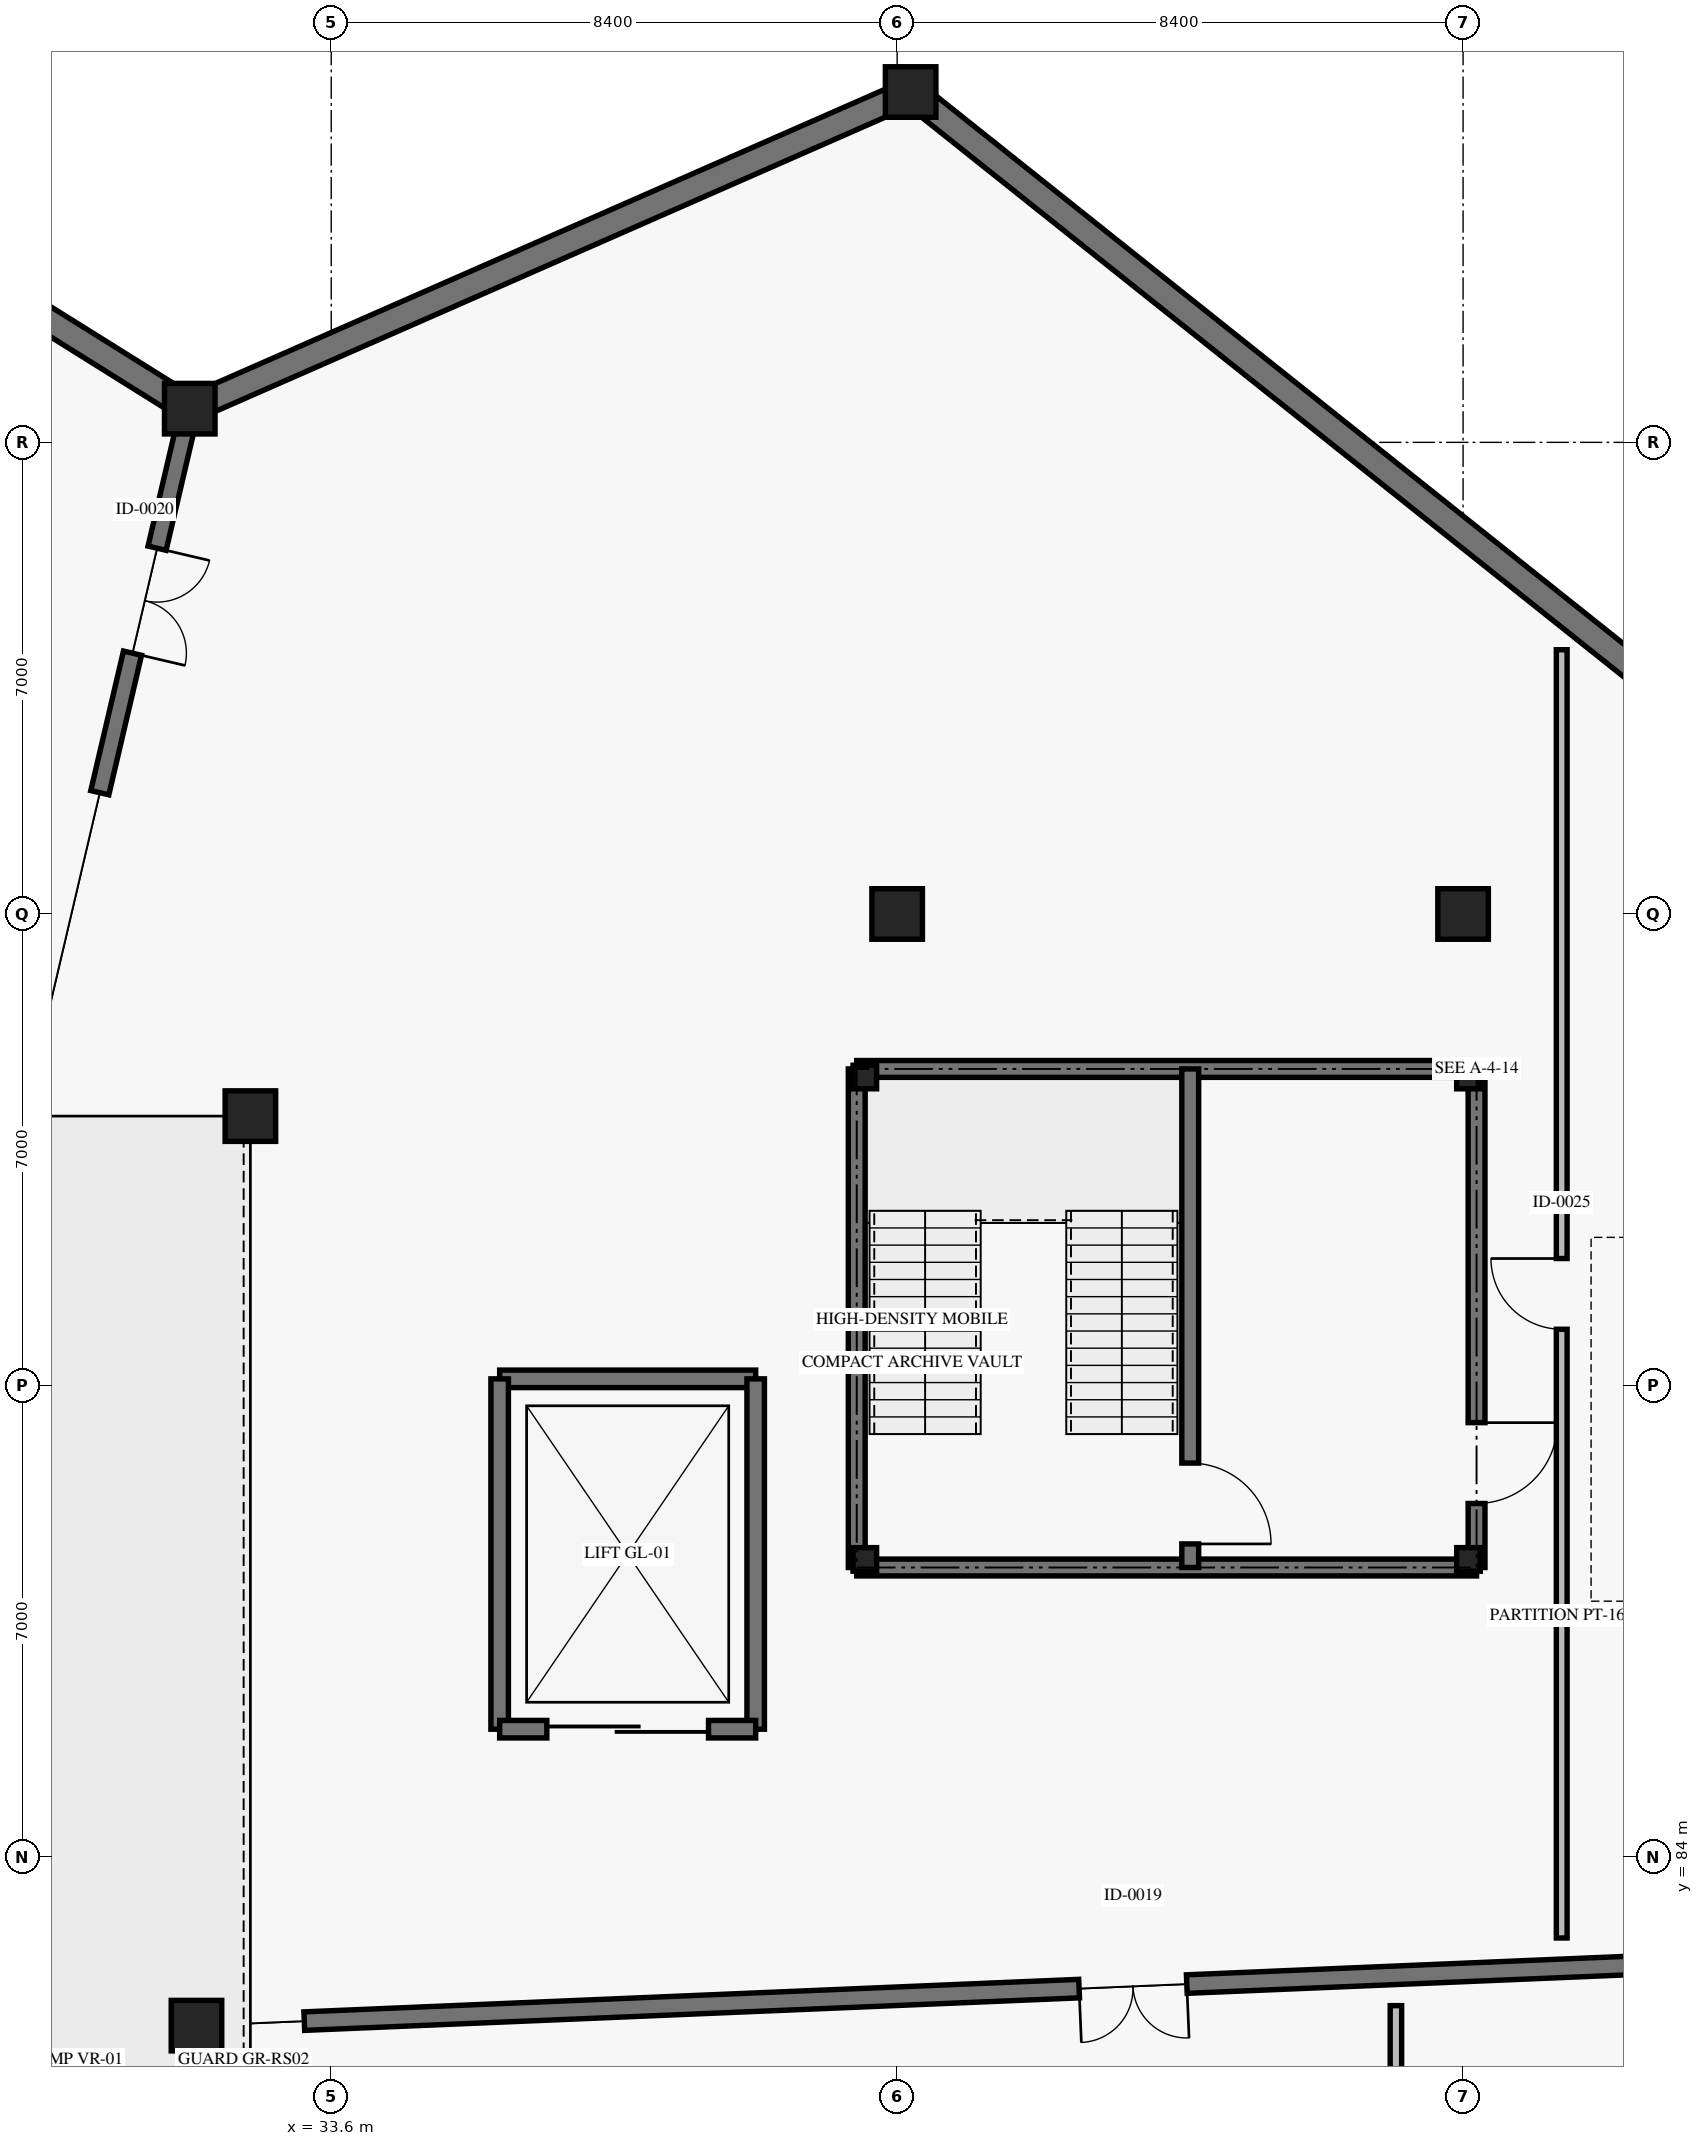
"""IFC4 building model, lengths in metres.
Left out: names, types, materials, properties, quantities, classifications, styles, units other than length and angle.
Written with IfcOpenShell. Run it as: python <this file> out.ifc"""

import sys

from ifc_helpers import new_model, si_unit, direction, frame, frame_2d, origin, origin_2d, place, context, subcontext, project, spatial, rectangle, i_section, extrude, element, fill, save


model = new_model("IFC4")
c1 = context("Model", 3, precision=1e-05, world=origin(), true_north=direction((0.0, 1.0)))
c2 = subcontext(c1, "Body", "Model", "MODEL_VIEW")
j1 = project(units=[si_unit("LENGTHUNIT", "METRE"), si_unit("PLANEANGLEUNIT", "RADIAN")], contexts=[c1])
p1 = place(None, origin())
s1 = spatial("IfcSite", under=j1, at=p1, CompositionType="ELEMENT")
p2 = place(p1, origin())
s2 = spatial("IfcBuilding", under=s1, at=p2, CompositionType="ELEMENT")
p3 = place(p2, frame((0.0, 0.0, -4.5)))
s3 = spatial("IfcBuildingStorey", under=s2, at=p3, CompositionType="ELEMENT", Elevation=-4.5)
for number, where, z_axis, x_axis in (
    (1, (31.5, 105.5, 0.0), (0.0, 0.0, 1.0), (1.0, 0.0, 0.0)),
    (2, (31.6, 81.5, 0.0), (0.0, 0.0, 1.0), (1.0, 0.0, 0.0)),
    (3, (42.2, 110.2, 0.0), (0.0, 0.0, 1.0), (1.0, 0.0, 0.0)),
    (4, (42.0, 98.0, 0.0), (0.0, 0.0, 1.0), (1.0, 0.0, 0.0)),
    (5, (50.4, 98.0, 0.0), (0.0, 0.0, 1.0), (1.0, 0.0, 0.0)),
    (6, (32.4, 95.0, 0.0), (0.0, 0.0, 1.0), (1.0, 0.0, 0.0)),
):
    element("IfcColumn", number, at=place(p3, frame(where, z_axis=z_axis, x_axis=x_axis)), inside=s3, PredefinedType="COLUMN", context=c2, shape_type="SweptSolid", body=[
        extrude(rectangle(XDim=0.75, YDim=0.75, at=origin_2d()), origin(), (0.0, 0.0, 1.0), 4.5),
    ])
for number, where, z_axis, x_axis in (
    (7, (41.52, 88.42, 0.0), (0.0, 0.0, 1.0), (1.0, 0.0, 0.0)),
    (8, (50.48, 88.42, 0.0), (0.0, 0.0, 1.0), (1.0, 0.0, 0.0)),
    (9, (50.48, 95.58, 0.0), (0.0, 0.0, 1.0), (1.0, 0.0, 0.0)),
    (10, (41.52, 95.58, 0.0), (0.0, 0.0, 1.0), (1.0, 0.0, 0.0)),
):
    element("IfcColumn", number, at=place(p3, frame(where, z_axis=z_axis, x_axis=x_axis)), inside=s3, PredefinedType="COLUMN", context=c2, shape_type="SweptSolid", body=[
        extrude(i_section(OverallWidth=0.35, OverallDepth=0.35, WebThickness=0.02, FlangeThickness=0.028, at=origin_2d()), origin(), (0.0, 0.0, 1.0), 4.5),
    ])
p4 = place(p3, frame((62.4, 94.1, 0.0), z_axis=(0.0, 0.0, 1.0), x_axis=(-0.78200261515, 0.623275147827, 0.0)))
e11 = element("IfcWall", 11, at=p4, inside=s3, PredefinedType="USERDEFINED", context=c2, shape_type="SweptSolid", body=[
    extrude(rectangle(XDim=25.831, YDim=0.38, at=frame_2d((12.916, 0.0))), origin(), (0.0, 0.0, 1.0), 4.14),
])
p5 = place(p3, frame((42.2, 110.2, 0.0), z_axis=(0.0, 0.0, 1.0), x_axis=(-0.915563585263, -0.402173247918, 0.0)))
e12 = element("IfcWall", 12, at=p5, inside=s3, PredefinedType="USERDEFINED", context=c2, shape_type="SweptSolid", body=[
    extrude(rectangle(XDim=11.637, YDim=0.38, at=frame_2d((5.818, 0.0))), origin(), (0.0, 0.0, 1.0), 4.14),
])
p6 = place(p3, frame((31.458, 105.526, 0.0), z_axis=(0.0, 0.0, 1.0), x_axis=(-0.847982583258, 0.530024092369, 0.0)))
e13 = element("IfcWall", 13, at=p6, inside=s3, PredefinedType="USERDEFINED", context=c2, shape_type="SweptSolid", body=[
    extrude(rectangle(XDim=12.215, YDim=0.38, at=frame_2d((6.107, 0.0))), origin(), (0.0, 0.0, 1.0), 4.14),
])
p7 = place(p3, frame((57.8, 82.6, 0.0), z_axis=(0.0, 0.0, 1.0), x_axis=(-0.999119166836, -0.041962965345, 0.0)))
e14 = element("IfcWall", 14, at=p7, inside=s3, PredefinedType="SOLIDWALL", context=c2, shape_type="SweptSolid", body=[
    extrude(rectangle(XDim=24.622, YDim=0.275, at=frame_2d((12.311, 0.0))), origin(), (0.0, 0.0, 1.0), 4.14),
])
p8 = place(p7, frame((11.511, 0.0, 0.0)))
e15 = element("IfcOpeningElement", 15, at=p8, cuts=e14, PredefinedType="OPENING", context=c2, shape_type="SweptSolid", body=[
    extrude(rectangle(XDim=1.6, YDim=2.45, at=frame_2d((0.8, 1.225))), frame((0.0, 0.147, 0.0), z_axis=(0.0, -1.0, 0.0), x_axis=(1.0, 0.0, 0.0)), (0.0, 0.0, 1.0), 0.295),
])
p9 = place(p3, frame((31.5, 105.5, 0.0), z_axis=(0.0, 0.0, 1.0), x_axis=(-0.228035044918, -0.973652924963, 0.0)))
e16 = element("IfcWall", 16, at=p9, inside=s3, PredefinedType="SOLIDWALL", context=c2, shape_type="SweptSolid", body=[
    extrude(rectangle(XDim=5.854, YDim=0.275, at=frame_2d((2.927, 0.0))), origin(), (0.0, 0.0, 1.0), 4.14),
])
p10 = place(p9, frame((2.127, 0.0, 0.0)))
e17 = element("IfcOpeningElement", 17, at=p10, cuts=e16, PredefinedType="OPENING", context=c2, shape_type="SweptSolid", body=[
    extrude(rectangle(XDim=1.6, YDim=2.45, at=frame_2d((0.8, 1.225))), frame((0.0, 0.147, 0.0), z_axis=(0.0, -1.0, 0.0), x_axis=(1.0, 0.0, 0.0)), (0.0, 0.0, 1.0), 0.295),
])
p11 = place(p3, frame((49.403, 57.267, 0.0), z_axis=(0.0, 0.0, 1.0), x_axis=(0.0, 1.0, 0.0)))
e18 = element("IfcWall", 18, at=p11, inside=s3, PredefinedType="PARTITIONING", context=c2, shape_type="SweptSolid", body=[
    extrude(rectangle(XDim=24.53, YDim=0.17, at=frame_2d((12.265, 0.0))), origin(), (0.0, 0.0, 1.0), 3.02),
])
p12 = place(p11, frame((11.715, 0.0, 0.0)))
e19 = element("IfcOpeningElement", 19, at=p12, cuts=e18, PredefinedType="OPENING", context=c2, shape_type="SweptSolid", body=[
    extrude(rectangle(XDim=1.1, YDim=2.2, at=frame_2d((0.55, 1.1))), frame((0.0, 0.095, 0.0), z_axis=(0.0, -1.0, 0.0), x_axis=(1.0, 0.0, 0.0)), (0.0, 0.0, 1.0), 0.19),
])
p13 = place(p3, frame((51.864, 82.801, 0.0), z_axis=(0.0, 0.0, 1.0), x_axis=(0.0, 1.0, 0.0)))
e20 = element("IfcWall", 20, at=p13, inside=s3, PredefinedType="PARTITIONING", context=c2, shape_type="SweptSolid", body=[
    extrude(rectangle(XDim=19.121, YDim=0.16, at=frame_2d((9.561, 0.0))), origin(), (0.0, 0.0, 1.0), 3.02),
])
p14 = place(p13, frame((9.035, 0.0, 0.0)))
e21 = element("IfcOpeningElement", 21, at=p14, cuts=e20, PredefinedType="OPENING", context=c2, shape_type="SweptSolid", body=[
    extrude(rectangle(XDim=1.05, YDim=2.2, at=frame_2d((0.525, 1.1))), frame((0.0, 0.09, 0.0), z_axis=(0.0, -1.0, 0.0), x_axis=(1.0, 0.0, 0.0)), (0.0, 0.0, 1.0), 0.18),
])
p15 = place(p3, frame((41.4, 88.3, 0.0), z_axis=(0.0, 0.0, 1.0), x_axis=(0.0, 1.0, 0.0)))
e22 = element("IfcWall", 22, at=p15, inside=s3, PredefinedType="SHEAR", context=c2, shape_type="SweptSolid", body=[
    extrude(rectangle(XDim=7.4, YDim=0.25, at=frame_2d((3.7, 0.0))), origin(), (0.0, 0.0, 1.0), 4.14),
])
for number, where, z_axis, x_axis in (
    (23, (41.4, 95.7, 0.0), (0.0, 0.0, 1.0), (1.0, 0.0, 0.0)),
    (24, (50.6, 88.3, 0.0), (0.0, 0.0, 1.0), (-1.0, 0.0, 0.0)),
):
    element("IfcWall", number, at=place(p3, frame(where, z_axis=z_axis, x_axis=x_axis)), inside=s3, PredefinedType="SHEAR", context=c2, shape_type="SweptSolid", body=[
        extrude(rectangle(XDim=9.2, YDim=0.25, at=frame_2d((4.6, 0.0))), origin(), (0.0, 0.0, 1.0), 4.14),
    ])
p16 = place(p3, frame((50.6, 95.7, 0.0), z_axis=(0.0, 0.0, 1.0), x_axis=(0.0, -1.0, 0.0)))
e25 = element("IfcWall", 25, at=p16, inside=s3, PredefinedType="SHEAR", context=c2, shape_type="SweptSolid", body=[
    extrude(rectangle(XDim=7.4, YDim=0.25, at=frame_2d((3.7, 0.0))), origin(), (0.0, 0.0, 1.0), 4.14),
])
p17 = place(p16, frame((5.25, 0.0, 0.0)))
e26 = element("IfcOpeningElement", 26, at=p17, cuts=e25, PredefinedType="OPENING", context=c2, shape_type="SweptSolid", body=[
    extrude(rectangle(XDim=1.2, YDim=2.2, at=frame_2d((0.6, 1.1))), frame((0.0, 0.135, 0.0), z_axis=(0.0, -1.0, 0.0), x_axis=(1.0, 0.0, 0.0)), (0.0, 0.0, 1.0), 0.27),
])
p18 = place(p3, frame((46.35, 95.7, 0.0), z_axis=(0.0, 0.0, 1.0), x_axis=(0.0, -1.0, 0.0)))
e27 = element("IfcWall", 27, at=p18, inside=s3, PredefinedType="SHEAR", context=c2, shape_type="SweptSolid", body=[
    extrude(rectangle(XDim=7.4, YDim=0.25, at=frame_2d((3.7, 0.0))), origin(), (0.0, 0.0, 1.0), 4.14),
])
p19 = place(p18, frame((5.85, 0.0, 0.0)))
e28 = element("IfcOpeningElement", 28, at=p19, cuts=e27, PredefinedType="OPENING", context=c2, shape_type="SweptSolid", body=[
    extrude(rectangle(XDim=1.2, YDim=2.2, at=frame_2d((0.6, 1.1))), frame((0.0, 0.135, 0.0), z_axis=(0.0, -1.0, 0.0), x_axis=(1.0, 0.0, 0.0)), (0.0, 0.0, 1.0), 0.27),
])
p20 = place(p3, frame((36.1, 91.1, 0.0), z_axis=(0.0, 0.0, 1.0), x_axis=(1.0, 0.0, 0.0)))
e29 = element("IfcWall", 29, at=p20, inside=s3, PredefinedType="SHEAR", context=c2, shape_type="SweptSolid", body=[
    extrude(rectangle(XDim=3.8, YDim=0.26, at=frame_2d((1.9, 0.0))), origin(), (0.0, 0.0, 1.0), 4.26),
])
for number, where, z_axis, x_axis in (
    (30, (39.9, 91.1, 0.0), (0.0, 0.0, 1.0), (0.0, -1.0, 0.0)),
    (31, (36.1, 85.9, 0.0), (0.0, 0.0, 1.0), (0.0, 1.0, 0.0)),
):
    element("IfcWall", number, at=place(p3, frame(where, z_axis=z_axis, x_axis=x_axis)), inside=s3, PredefinedType="SHEAR", context=c2, shape_type="SweptSolid", body=[
        extrude(rectangle(XDim=5.2, YDim=0.26, at=frame_2d((2.6, 0.0))), origin(), (0.0, 0.0, 1.0), 4.26),
    ])
p21 = place(p3, frame((39.9, 85.9, 0.0), z_axis=(0.0, 0.0, 1.0), x_axis=(-1.0, 0.0, 0.0)))
e32 = element("IfcWall", 32, at=p21, inside=s3, PredefinedType="SHEAR", context=c2, shape_type="SweptSolid", body=[
    extrude(rectangle(XDim=3.8, YDim=0.26, at=frame_2d((1.9, 0.0))), origin(), (0.0, 0.0, 1.0), 4.26),
])
p22 = place(p21, frame((0.7, 0.0, 0.0)))
e33 = element("IfcOpeningElement", 33, at=p22, cuts=e32, PredefinedType="OPENING", context=c2, shape_type="SweptSolid", body=[
    extrude(rectangle(XDim=2.4, YDim=2.85, at=frame_2d((1.2, 1.425))), frame((0.0, 0.14, 0.0), z_axis=(0.0, -1.0, 0.0), x_axis=(1.0, 0.0, 0.0)), (0.0, 0.0, 1.0), 0.28),
])
p23 = place(p8, origin())
e34 = element("IfcDoor", 34, at=p23, inside=s3, OperationType="DOUBLE_DOOR_SINGLE_SWING", PredefinedType="DOOR", context=c2, shape_type="SweptSolid", body=[
    extrude(rectangle(XDim=1.6, YDim=2.45, at=frame_2d((0.8, 1.225))), frame((0.0, 0.025, 0.0), z_axis=(0.0, -1.0, 0.0), x_axis=(1.0, 0.0, 0.0)), (0.0, 0.0, 1.0), 0.05),
])
fill(e15, e34)
p24 = place(p10, origin())
e35 = element("IfcDoor", 35, at=p24, inside=s3, OperationType="DOUBLE_DOOR_SINGLE_SWING", PredefinedType="DOOR", context=c2, shape_type="SweptSolid", body=[
    extrude(rectangle(XDim=1.6, YDim=2.45, at=frame_2d((0.8, 1.225))), frame((0.0, 0.025, 0.0), z_axis=(0.0, -1.0, 0.0), x_axis=(1.0, 0.0, 0.0)), (0.0, 0.0, 1.0), 0.05),
])
fill(e17, e35)
p25 = place(p14, origin())
e36 = element("IfcDoor", 36, at=p25, inside=s3, OperationType="SINGLE_SWING_RIGHT", PredefinedType="DOOR", context=c2, shape_type="SweptSolid", body=[
    extrude(rectangle(XDim=1.05, YDim=2.2, at=frame_2d((0.525, 1.1))), frame((0.0, 0.025, 0.0), z_axis=(0.0, -1.0, 0.0), x_axis=(1.0, 0.0, 0.0)), (0.0, 0.0, 1.0), 0.05),
])
fill(e21, e36)
p26 = place(p17, origin())
e37 = element("IfcDoor", 37, at=p26, inside=s3, OperationType="SINGLE_SWING_LEFT", PredefinedType="DOOR", context=c2, shape_type="SweptSolid", body=[
    extrude(rectangle(XDim=1.2, YDim=2.2, at=frame_2d((0.6, 1.1))), frame((0.0, 0.025, 0.0), z_axis=(0.0, -1.0, 0.0), x_axis=(1.0, 0.0, 0.0)), (0.0, 0.0, 1.0), 0.05),
])
fill(e26, e37)
p27 = place(p19, origin())
e38 = element("IfcDoor", 38, at=p27, inside=s3, OperationType="SINGLE_SWING_RIGHT", PredefinedType="DOOR", context=c2, shape_type="SweptSolid", body=[
    extrude(rectangle(XDim=1.2, YDim=2.2, at=frame_2d((0.6, 1.1))), frame((0.0, 0.025, 0.0), z_axis=(0.0, -1.0, 0.0), x_axis=(1.0, 0.0, 0.0)), (0.0, 0.0, 1.0), 0.05),
])
fill(e28, e38)
p28 = place(p22, origin())
e39 = element("IfcDoor", 39, at=p28, inside=s3, OperationType="SLIDING_TO_LEFT", PredefinedType="DOOR", context=c2, shape_type="SweptSolid", body=[
    extrude(rectangle(XDim=2.4, YDim=2.85, at=frame_2d((1.2, 1.425))), frame((0.0, 0.025, 0.0), z_axis=(0.0, -1.0, 0.0), x_axis=(1.0, 0.0, 0.0)), (0.0, 0.0, 1.0), 0.05),
])
fill(e33, e39)
save(model, sys.argv[1])
